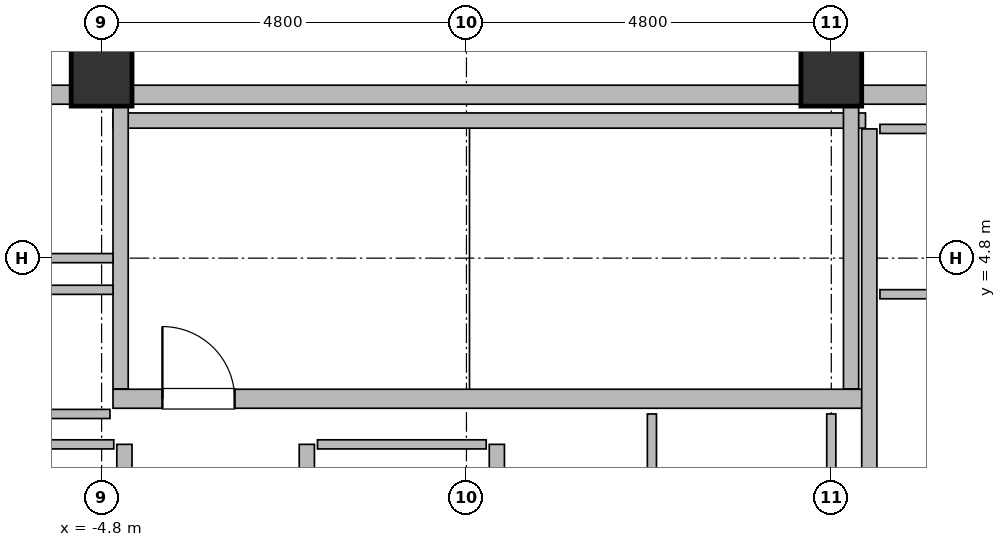
"""IFC4 building model, lengths in metres.
Left out: names, types, materials, properties, quantities, classifications, styles, units other than length and angle.
Written with IfcOpenShell. Run it as: python <this file> out.ifc"""

import sys

from ifc_helpers import new_model, si_unit, direction, frame, frame_2d, origin, origin_2d, place, context, subcontext, project, spatial, rectangle, hollow_rectangle, extrude, element, fill, save


model = new_model("IFC4")
c1 = context("Model", 3, precision=1e-05, world=origin(), true_north=direction((0.0, 1.0)))
c2 = subcontext(c1, "Body", "Model", "MODEL_VIEW")
j1 = project(units=[si_unit("LENGTHUNIT", "METRE"), si_unit("PLANEANGLEUNIT", "RADIAN")], contexts=[c1])
p1 = place(None, origin())
s1 = spatial("IfcSite", under=j1, at=p1, CompositionType="ELEMENT")
p2 = place(p1, origin())
s2 = spatial("IfcBuilding", under=s1, at=p2, CompositionType="ELEMENT")
p3 = place(p2, frame((0.0, 0.0, 48.5)))
s3 = spatial("IfcBuildingStorey", under=s2, at=p3, CompositionType="ELEMENT", Elevation=48.5)
for number, where, z_axis, x_axis in (
    (1, (-4.8, 7.2, 0.0), (0.0, 0.0, 1.0), (1.0, 0.0, 0.0)),
    (2, (4.8, 7.2, 0.0), (0.0, 0.0, 1.0), (1.0, 0.0, 0.0)),
):
    element("IfcColumn", number, at=place(p3, frame(where, z_axis=z_axis, x_axis=x_axis)), inside=s3, PredefinedType="COLUMN", context=c2, shape_type="SweptSolid", body=[
        extrude(hollow_rectangle(XDim=0.8, YDim=0.8, WallThickness=0.036, at=origin_2d()), origin(), (0.0, 0.0, 1.0), 3.7),
    ])
p4 = place(p3, frame((-14.2, 6.95, 0.0), z_axis=(0.0, 0.0, 1.0), x_axis=(1.0, 0.0, 0.0)))
e3 = element("IfcWall", 3, at=p4, inside=s3, PredefinedType="SOLIDWALL", context=c2, shape_type="SweptSolid", body=[
    extrude(rectangle(XDim=9.4, YDim=0.25, at=frame_2d((4.7, 0.0))), origin(), (0.0, 0.0, 1.0), 2.62),
])
p5 = place(p4, frame((4.9, 0.0, 0.0)))
e4 = element("IfcOpeningElement", 4, at=p5, cuts=e3, PredefinedType="OPENING", context=c2, shape_type="SweptSolid", body=[
    extrude(rectangle(XDim=1.0, YDim=2.15, at=frame_2d((0.5, 1.075))), frame((0.0, 0.14, 0.0), z_axis=(0.0, -1.0, 0.0), x_axis=(1.0, 0.0, 0.0)), (0.0, 0.0, 1.0), 0.28),
])
p6 = place(p3, frame((-4.6, 6.95, 0.0), z_axis=(0.0, 0.0, 1.0), x_axis=(1.0, 0.0, 0.0)))
e5 = element("IfcWall", 5, at=p6, inside=s3, PredefinedType="SOLIDWALL", context=c2, shape_type="SweptSolid", body=[
    extrude(rectangle(XDim=9.2, YDim=0.25, at=frame_2d((4.6, 0.0))), origin(), (0.0, 0.0, 1.0), 2.62),
])
p7 = place(p3, frame((4.8, 6.95, 0.0), z_axis=(0.0, 0.0, 1.0), x_axis=(1.0, 0.0, 0.0)))
e6 = element("IfcWall", 6, at=p7, inside=s3, PredefinedType="SOLIDWALL", context=c2, shape_type="SweptSolid", body=[
    extrude(rectangle(XDim=9.4, YDim=0.25, at=frame_2d((4.7, 0.0))), origin(), (0.0, 0.0, 1.0), 2.62),
])
p8 = place(p7, frame((3.5, 0.0, 0.0)))
e7 = element("IfcOpeningElement", 7, at=p8, cuts=e6, PredefinedType="OPENING", context=c2, shape_type="SweptSolid", body=[
    extrude(rectangle(XDim=1.2, YDim=2.2, at=frame_2d((0.6, 1.1))), frame((0.0, 0.14, 0.0), z_axis=(0.0, -1.0, 0.0), x_axis=(1.0, 0.0, 0.0)), (0.0, 0.0, 1.0), 0.28),
])
p9 = place(p3, frame((-4.65, 2.95, -0.18), z_axis=(0.0, 0.0, 1.0), x_axis=(1.0, 0.0, 0.0)))
e8 = element("IfcWall", 8, at=p9, inside=s3, PredefinedType="SOLIDWALL", context=c2, shape_type="SweptSolid", body=[
    extrude(rectangle(XDim=9.9, YDim=0.25, at=frame_2d((4.95, 0.0))), origin(), (0.0, 0.0, 1.0), 3.7),
])
p10 = place(p9, frame((0.65, 0.0, 0.18)))
e9 = element("IfcOpeningElement", 9, at=p10, cuts=e8, PredefinedType="OPENING", context=c2, shape_type="SweptSolid", body=[
    extrude(rectangle(XDim=0.95, YDim=2.15, at=frame_2d((0.475, 1.075))), frame((0.0, 0.14, 0.0), z_axis=(0.0, -1.0, 0.0), x_axis=(1.0, 0.0, 0.0)), (0.0, 0.0, 1.0), 0.28),
])
p11 = place(p3, frame((-4.65, 6.61, -0.18), z_axis=(0.0, 0.0, 1.0), x_axis=(1.0, 0.0, 0.0)))
e10 = element("IfcWall", 10, at=p11, inside=s3, PredefinedType="SOLIDWALL", context=c2, shape_type="SweptSolid", body=[
    extrude(rectangle(XDim=9.9, YDim=0.2, at=frame_2d((4.95, 0.0))), origin(), (0.0, 0.0, 1.0), 3.7),
])
for number, where, z_axis, x_axis in (
    (11, (-4.55, 3.08, -0.18), (0.0, 0.0, 1.0), (0.0, 1.0, 0.0)),
    (12, (5.06, 3.08, -0.18), (0.0, 0.0, 1.0), (0.0, 1.0, 0.0)),
):
    element("IfcWall", number, at=place(p3, frame(where, z_axis=z_axis, x_axis=x_axis)), inside=s3, PredefinedType="SOLIDWALL", context=c2, shape_type="SweptSolid", body=[
        extrude(rectangle(XDim=3.74, YDim=0.2, at=frame_2d((1.87, 0.0))), origin(), (0.0, 0.0, 1.0), 3.7),
    ])
p12 = place(p3, frame((-4.5, -6.5, 0.0), z_axis=(0.0, 0.0, 1.0), x_axis=(0.0, 1.0, 0.0)))
e13 = element("IfcWall", 13, at=p12, inside=s3, PredefinedType="SOLIDWALL", context=c2, shape_type="SweptSolid", body=[
    extrude(rectangle(XDim=8.85, YDim=0.2, at=frame_2d((4.425, 0.0))), origin(), (0.0, 0.0, 1.0), 3.52),
])
p13 = place(p12, frame((0.5, 0.0, 0.0)))
e14 = element("IfcOpeningElement", 14, at=p13, cuts=e13, PredefinedType="OPENING", context=c2, shape_type="SweptSolid", body=[
    extrude(rectangle(XDim=1.1, YDim=2.2, at=frame_2d((0.55, 1.1))), frame((0.0, 0.115, 0.0), z_axis=(0.0, -1.0, 0.0), x_axis=(1.0, 0.0, 0.0)), (0.0, 0.0, 1.0), 0.23),
])
p14 = place(p12, frame((2.75, 0.0, 0.0)))
e15 = element("IfcOpeningElement", 15, at=p14, cuts=e13, PredefinedType="OPENING", context=c2, shape_type="SweptSolid", body=[
    extrude(rectangle(XDim=1.1, YDim=2.2, at=frame_2d((0.55, 1.1))), frame((0.0, 0.115, 0.0), z_axis=(0.0, -1.0, 0.0), x_axis=(1.0, 0.0, 0.0)), (0.0, 0.0, 1.0), 0.23),
])
p15 = place(p12, frame((5.0, 0.0, 0.0)))
e16 = element("IfcOpeningElement", 16, at=p15, cuts=e13, PredefinedType="OPENING", context=c2, shape_type="SweptSolid", body=[
    extrude(rectangle(XDim=1.1, YDim=2.2, at=frame_2d((0.55, 1.1))), frame((0.0, 0.115, 0.0), z_axis=(0.0, -1.0, 0.0), x_axis=(1.0, 0.0, 0.0)), (0.0, 0.0, 1.0), 0.23),
])
p16 = place(p12, frame((7.25, 0.0, 0.0)))
e17 = element("IfcOpeningElement", 17, at=p16, cuts=e13, PredefinedType="OPENING", context=c2, shape_type="SweptSolid", body=[
    extrude(rectangle(XDim=1.1, YDim=2.2, at=frame_2d((0.55, 1.1))), frame((0.0, 0.115, 0.0), z_axis=(0.0, -1.0, 0.0), x_axis=(1.0, 0.0, 0.0)), (0.0, 0.0, 1.0), 0.23),
])
p17 = place(p3, frame((-6.86, 2.35, 0.0), z_axis=(0.0, 0.0, 1.0), x_axis=(1.0, 0.0, 0.0)))
e18 = element("IfcWall", 18, at=p17, inside=s3, PredefinedType="PARTITIONING", context=c2, shape_type="SweptSolid", body=[
    extrude(rectangle(XDim=2.22, YDim=0.12, at=frame_2d((1.11, 0.0))), origin(), (0.0, 0.0, 1.0), 3.52),
])
for number, where, z_axis, x_axis in (
    (19, (-2.1, -6.5, 0.0), (0.0, 0.0, 1.0), (0.0, 1.0, 0.0)),
    (20, (0.4, -6.5, 0.0), (0.0, 0.0, 1.0), (0.0, 1.0, 0.0)),
):
    element("IfcWall", number, at=place(p3, frame(where, z_axis=z_axis, x_axis=x_axis)), inside=s3, PredefinedType="SOLIDWALL", context=c2, shape_type="SweptSolid", body=[
        extrude(rectangle(XDim=8.85, YDim=0.2, at=frame_2d((4.425, 0.0))), origin(), (0.0, 0.0, 1.0), 3.52),
    ])
p18 = place(p3, frame((-1.96, 2.35, 0.0), z_axis=(0.0, 0.0, 1.0), x_axis=(1.0, 0.0, 0.0)))
e21 = element("IfcWall", 21, at=p18, inside=s3, PredefinedType="PARTITIONING", context=c2, shape_type="SweptSolid", body=[
    extrude(rectangle(XDim=2.22, YDim=0.12, at=frame_2d((1.11, 0.0))), origin(), (0.0, 0.0, 1.0), 3.52),
])
p19 = place(p3, frame((5.3, -0.3, 0.0), z_axis=(0.0, 0.0, 1.0), x_axis=(0.0, 1.0, 0.0)))
e22 = element("IfcWall", 22, at=p19, inside=s3, PredefinedType="SOLIDWALL", context=c2, shape_type="SweptSolid", body=[
    extrude(rectangle(XDim=6.8, YDim=0.2, at=frame_2d((3.4, 0.0))), origin(), (0.0, 0.0, 1.0), 3.52),
])
for number, where, z_axis, x_axis in (
    (23, (5.44, 4.325, 0.0), (0.0, 0.0, 1.0), (1.0, 0.0, 0.0)),
    (24, (5.44, 6.5, 0.0), (0.0, 0.0, 1.0), (1.0, 0.0, 0.0)),
):
    element("IfcWall", number, at=place(p3, frame(where, z_axis=z_axis, x_axis=x_axis)), inside=s3, PredefinedType="PARTITIONING", context=c2, shape_type="SweptSolid", body=[
        extrude(rectangle(XDim=2.12, YDim=0.12, at=frame_2d((1.06, 0.0))), origin(), (0.0, 0.0, 1.0), 3.52),
    ])
p20 = place(p3, frame((-7.0, 2.75, 0.0), z_axis=(0.0, 0.0, 1.0), x_axis=(1.0, 0.0, 0.0)))
e25 = element("IfcWall", 25, at=p20, inside=s3, PredefinedType="PARTITIONING", context=c2, shape_type="SweptSolid", body=[
    extrude(rectangle(XDim=2.31, YDim=0.12, at=frame_2d((1.155, 0.0))), origin(), (0.0, 0.0, 1.0), 3.52),
])
for number, where, z_axis, x_axis in (
    (26, (-7.0, 4.383, 0.0), (0.0, 0.0, 1.0), (1.0, 0.0, 0.0)),
    (27, (-7.0, 4.8, 0.0), (0.0, 0.0, 1.0), (1.0, 0.0, 0.0)),
):
    element("IfcWall", number, at=place(p3, frame(where, z_axis=z_axis, x_axis=x_axis)), inside=s3, PredefinedType="PARTITIONING", context=c2, shape_type="SweptSolid", body=[
        extrude(rectangle(XDim=2.35, YDim=0.12, at=frame_2d((1.175, 0.0))), origin(), (0.0, 0.0, 1.0), 3.52),
    ])
p21 = place(p3, frame((2.44, -6.5, 0.0), z_axis=(0.0, 0.0, 1.0), x_axis=(0.0, 1.0, 0.0)))
e28 = element("IfcWall", 28, at=p21, inside=s3, PredefinedType="PARTITIONING", context=c2, shape_type="SweptSolid", body=[
    extrude(rectangle(XDim=9.25, YDim=0.12, at=frame_2d((4.625, 0.0))), origin(), (0.0, 0.0, 1.0), 3.52),
])
p22 = place(p21, frame((4.05, 0.0, 0.0)))
e29 = element("IfcOpeningElement", 29, at=p22, cuts=e28, PredefinedType="OPENING", context=c2, shape_type="SweptSolid", body=[
    extrude(rectangle(XDim=0.9, YDim=2.1, at=frame_2d((0.45, 1.05))), frame((0.0, 0.075, 0.0), z_axis=(0.0, -1.0, 0.0), x_axis=(1.0, 0.0, 0.0)), (0.0, 0.0, 1.0), 0.15),
])
p23 = place(p3, frame((4.8, -6.415, 0.0), z_axis=(0.0, 0.0, 1.0), x_axis=(0.0, 1.0, 0.0)))
e30 = element("IfcWall", 30, at=p23, inside=s3, PredefinedType="PARTITIONING", context=c2, shape_type="SweptSolid", body=[
    extrude(rectangle(XDim=9.165, YDim=0.12, at=frame_2d((4.583, 0.0))), origin(), (0.0, 0.0, 1.0), 3.52),
])
p24 = place(p10, origin())
e31 = element("IfcDoor", 31, at=p24, inside=s3, OperationType="SINGLE_SWING_RIGHT", PredefinedType="DOOR", context=c2, shape_type="SweptSolid", body=[
    extrude(rectangle(XDim=0.95, YDim=2.15, at=frame_2d((0.475, 1.075))), frame((0.0, 0.025, 0.0), z_axis=(0.0, -1.0, 0.0), x_axis=(1.0, 0.0, 0.0)), (0.0, 0.0, 1.0), 0.05),
])
fill(e9, e31)
save(model, sys.argv[1])
